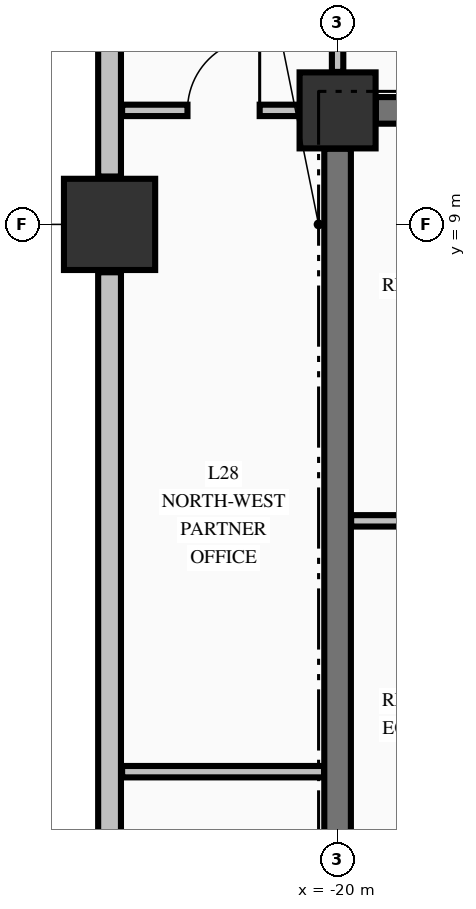
"""IFC4 building model, lengths in metres.
Left out: names, types, materials, properties, quantities, classifications, styles, units other than length and angle.
Written with IfcOpenShell. Run it as: python <this file> out.ifc"""

import sys

from ifc_helpers import new_model, si_unit, direction, frame, frame_2d, origin, origin_2d, place, context, subcontext, project, spatial, rectangle, extrude, element, fill, save


model = new_model("IFC4")
c1 = context("Model", 3, precision=1e-05, world=origin(), true_north=direction((0.0, 1.0)))
c2 = subcontext(c1, "Body", "Model", "MODEL_VIEW")
j1 = project(units=[si_unit("LENGTHUNIT", "METRE"), si_unit("PLANEANGLEUNIT", "RADIAN")], contexts=[c1])
p1 = place(None, origin())
s1 = spatial("IfcSite", under=j1, at=p1, CompositionType="ELEMENT")
p2 = place(p1, origin())
s2 = spatial("IfcBuilding", under=s1, at=p2, CompositionType="ELEMENT")
p3 = place(p2, frame((0.0, 0.0, 112.78)))
s3 = spatial("IfcBuildingStorey", under=s2, at=p3, CompositionType="ELEMENT", Elevation=112.78)
p4 = place(p3, frame((-23.0, 9.0, -0.25), z_axis=(0.0, 0.0, 1.0), x_axis=(1.0, 0.0, 0.0)))
e1 = element("IfcColumn", 1, at=p4, inside=s3, PredefinedType="COLUMN", context=c2, shape_type="SweptSolid", body=[
    extrude(rectangle(XDim=1.2, YDim=1.2, at=origin_2d()), origin(), (0.0, 0.0, 1.0), 3.395),
])
p5 = place(p3, frame((-20.0, 10.5, -0.25), z_axis=(0.0, 0.0, 1.0), x_axis=(1.0, 0.0, 0.0)))
e2 = element("IfcColumn", 2, at=p5, inside=s3, PredefinedType="COLUMN", context=c2, shape_type="SweptSolid", body=[
    extrude(rectangle(XDim=1.0, YDim=1.0, at=origin_2d()), origin(), (0.0, 0.0, 1.0), 3.395),
])
p6 = place(p3, frame((-23.0, 8.37, 0.0), z_axis=(0.0, 0.0, 1.0), x_axis=(0.0, -1.0, 0.0)))
e3 = element("IfcWall", 3, at=p6, inside=s3, PredefinedType="STANDARD", context=c2, shape_type="SweptSolid", body=[
    extrude(rectangle(XDim=7.74, YDim=0.3, at=frame_2d((3.87, 0.0))), origin(), (0.0, 0.0, 1.0), 2.537),
])
p7 = place(p3, frame((-23.0, 20.37, 0.0), z_axis=(0.0, 0.0, 1.0), x_axis=(0.0, -1.0, 0.0)))
e4 = element("IfcWall", 4, at=p7, inside=s3, PredefinedType="STANDARD", context=c2, shape_type="SweptSolid", body=[
    extrude(rectangle(XDim=10.74, YDim=0.3, at=frame_2d((5.37, 0.0))), origin(), (0.0, 0.0, 1.0), 2.537),
])
p8 = place(p3, frame((-19.496, 10.5, 0.0), z_axis=(0.0, 0.0, 1.0), x_axis=(1.0, 0.0, 0.0)))
e5 = element("IfcWall", 5, at=p8, inside=s3, PredefinedType="SHEAR", context=c2, shape_type="SweptSolid", body=[
    extrude(rectangle(XDim=4.796, YDim=0.35, at=frame_2d((2.398, 0.0))), origin(), (0.0, 0.0, 1.0), 3.145),
])
p9 = place(p8, frame((0.471, 0.0, 0.0)))
e6 = element("IfcOpeningElement", 6, at=p9, cuts=e5, PredefinedType="OPENING", context=c2, shape_type="SweptSolid", body=[
    extrude(rectangle(XDim=0.95, YDim=2.15, at=frame_2d((0.475, 1.075))), frame((0.0, 0.185, 0.0), z_axis=(0.0, -1.0, 0.0), x_axis=(1.0, 0.0, 0.0)), (0.0, 0.0, 1.0), 0.37),
])
p10 = place(p8, frame((3.046, 0.0, 0.0)))
e7 = element("IfcOpeningElement", 7, at=p10, cuts=e5, PredefinedType="OPENING", context=c2, shape_type="SweptSolid", body=[
    extrude(rectangle(XDim=0.9, YDim=2.15, at=frame_2d((0.45, 1.075))), frame((0.0, 0.185, 0.0), z_axis=(0.0, -1.0, 0.0), x_axis=(1.0, 0.0, 0.0)), (0.0, 0.0, 1.0), 0.37),
])
p11 = place(p3, frame((-22.835, 1.8, 0.0), z_axis=(0.0, 0.0, 1.0), x_axis=(1.0, 0.0, 0.0)))
e8 = element("IfcWall", 8, at=p11, inside=s3, PredefinedType="PARTITIONING", context=c2, shape_type="SweptSolid", body=[
    extrude(rectangle(XDim=2.657, YDim=0.15, at=frame_2d((1.329, 0.0))), origin(), (0.0, 0.0, 1.0), 3.145),
])
p12 = place(p3, frame((-19.822, 5.1, 0.0), z_axis=(0.0, 0.0, 1.0), x_axis=(1.0, 0.0, 0.0)))
e9 = element("IfcWall", 9, at=p12, inside=s3, PredefinedType="PARTITIONING", context=c2, shape_type="SweptSolid", body=[
    extrude(rectangle(XDim=2.547, YDim=0.15, at=frame_2d((1.273, 0.0))), origin(), (0.0, 0.0, 1.0), 3.145),
])
p13 = place(p12, frame((0.797, 0.0, 0.0)))
e10 = element("IfcOpeningElement", 10, at=p13, cuts=e9, PredefinedType="OPENING", context=c2, shape_type="SweptSolid", body=[
    extrude(rectangle(XDim=0.95, YDim=2.15, at=frame_2d((0.475, 1.075))), frame((0.0, 0.085, 0.0), z_axis=(0.0, -1.0, 0.0), x_axis=(1.0, 0.0, 0.0)), (0.0, 0.0, 1.0), 0.17),
])
p14 = place(p3, frame((-22.835, 10.5, 0.0), z_axis=(0.0, 0.0, 1.0), x_axis=(1.0, 0.0, 0.0)))
e11 = element("IfcWall", 11, at=p14, inside=s3, PredefinedType="PARTITIONING", context=c2, shape_type="SweptSolid", body=[
    extrude(rectangle(XDim=2.329, YDim=0.15, at=frame_2d((1.165, 0.0))), origin(), (0.0, 0.0, 1.0), 3.145),
])
p15 = place(p14, frame((0.86, 0.0, 0.0)))
e12 = element("IfcOpeningElement", 12, at=p15, cuts=e11, PredefinedType="OPENING", context=c2, shape_type="SweptSolid", body=[
    extrude(rectangle(XDim=0.95, YDim=2.15, at=frame_2d((0.475, 1.075))), frame((0.0, 0.085, 0.0), z_axis=(0.0, -1.0, 0.0), x_axis=(1.0, 0.0, 0.0)), (0.0, 0.0, 1.0), 0.17),
])
p16 = place(p3, frame((-20.0, 0.504, 0.0), z_axis=(0.0, 0.0, 1.0), x_axis=(0.0, 1.0, 0.0)))
e13 = element("IfcWall", 13, at=p16, inside=s3, PredefinedType="SHEAR", context=c2, shape_type="SweptSolid", body=[
    extrude(rectangle(XDim=9.492, YDim=0.35, at=frame_2d((4.746, 0.0))), origin(), (0.0, 0.0, 1.0), 3.145),
])
p17 = place(p3, frame((-20.0, 11.006, 0.0), z_axis=(0.0, 0.0, 1.0), x_axis=(0.0, 1.0, 0.0)))
e14 = element("IfcWall", 14, at=p17, inside=s3, PredefinedType="PARTITIONING", context=c2, shape_type="SweptSolid", body=[
    extrude(rectangle(XDim=2.066, YDim=0.15, at=frame_2d((1.033, 0.0))), origin(), (0.0, 0.0, 1.0), 2.635),
])
p18 = place(p17, frame((0.339, 0.0, 0.0)))
e15 = element("IfcOpeningElement", 15, at=p18, cuts=e14, PredefinedType="OPENING", context=c2, shape_type="SweptSolid", body=[
    extrude(rectangle(XDim=0.95, YDim=2.15, at=frame_2d((0.475, 1.075))), frame((0.0, 0.085, 0.0), z_axis=(0.0, -1.0, 0.0), x_axis=(1.0, 0.0, 0.0)), (0.0, 0.0, 1.0), 0.17),
])
p19 = place(p15, origin())
e16 = element("IfcDoor", 16, at=p19, inside=s3, OperationType="SINGLE_SWING_RIGHT", PredefinedType="DOOR", context=c2, shape_type="SweptSolid", body=[
    extrude(rectangle(XDim=0.95, YDim=2.15, at=frame_2d((0.475, 1.075))), frame((0.0, 0.025, 0.0), z_axis=(0.0, -1.0, 0.0), x_axis=(1.0, 0.0, 0.0)), (0.0, 0.0, 1.0), 0.05),
])
fill(e12, e16)
save(model, sys.argv[1])
